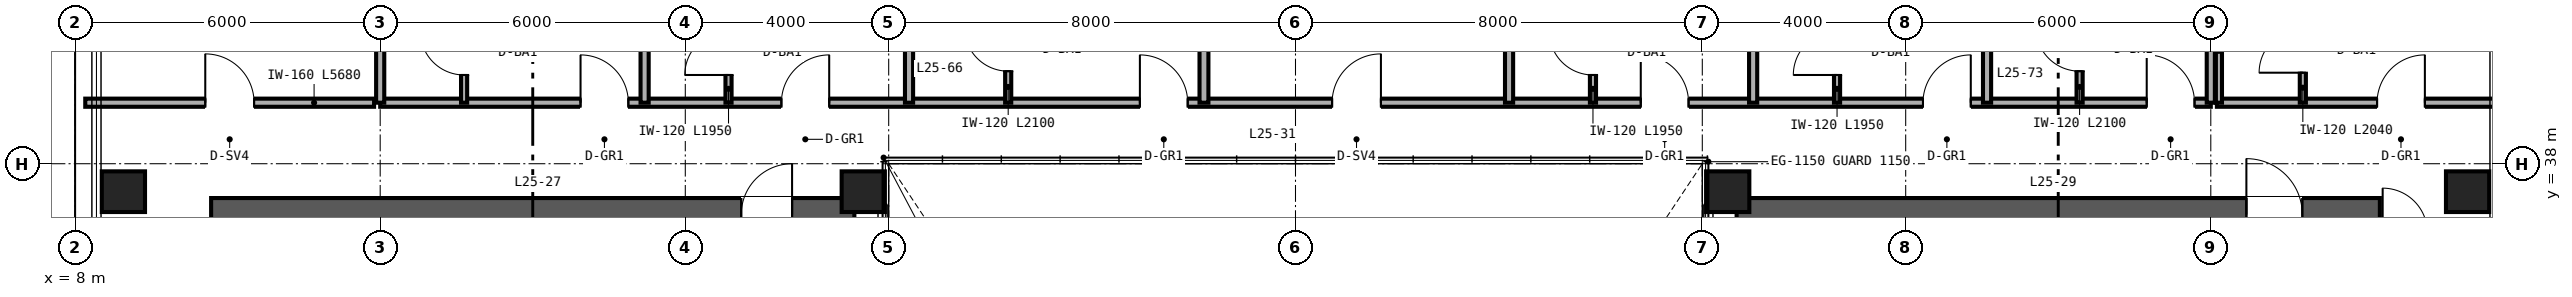
"""IFC4 building model, lengths in metres.
Left out: names, types, materials, properties, quantities, classifications, styles, units other than length and angle.
Written with IfcOpenShell. Run it as: python <this file> out.ifc"""

import sys

from ifc_helpers import new_model, si_unit, direction, frame, frame_2d, origin, origin_2d, place, context, subcontext, project, spatial, rectangle, hollow_rectangle, extrude, source, transform, mapped, element, fill, save


model = new_model("IFC4")
c1 = context("Model", 3, precision=1e-05, world=origin(), true_north=direction((0.0, 1.0)))
c2 = subcontext(c1, "Body", "Model", "MODEL_VIEW")
j1 = project(units=[si_unit("LENGTHUNIT", "METRE"), si_unit("PLANEANGLEUNIT", "RADIAN")], contexts=[c1])
p1 = place(None, origin())
s1 = spatial("IfcSite", under=j1, at=p1, CompositionType="ELEMENT")
p2 = place(p1, origin())
s2 = spatial("IfcBuilding", under=s1, at=p2, CompositionType="ELEMENT")
p3 = place(p2, frame((0.0, 0.0, 104.4)))
s3 = spatial("IfcBuildingStorey", under=s2, at=p3, CompositionType="ELEMENT", Elevation=104.4)
p4 = place(p3, frame((10.675, 37.0, 0.0), z_axis=(0.0, 0.0, 1.0), x_axis=(1.0, 0.0, 0.0)))
e1 = element("IfcWall", 1, at=p4, inside=s3, PredefinedType="SHEAR", context=c2, shape_type="SweptSolid", body=[
    extrude(rectangle(XDim=12.65, YDim=0.65, at=frame_2d((6.325, 0.0))), origin(), (0.0, 0.0, 1.0), 3.36),
])
p5 = place(p4, frame((10.425, 0.0, 0.0)))
e2 = element("IfcOpeningElement", 2, at=p5, cuts=e1, PredefinedType="OPENING", context=c2, shape_type="SweptSolid", body=[
    extrude(rectangle(XDim=1.0, YDim=2.15, at=frame_2d((0.5, 1.075))), frame((0.0, 0.335, 0.0), z_axis=(0.0, -1.0, 0.0), x_axis=(1.0, 0.0, 0.0)), (0.0, 0.0, 1.0), 0.67),
])
p6 = place(p3, frame((40.675, 37.0, 0.0), z_axis=(0.0, 0.0, 1.0), x_axis=(1.0, 0.0, 0.0)))
e3 = element("IfcWall", 3, at=p6, inside=s3, PredefinedType="SHEAR", context=c2, shape_type="SweptSolid", body=[
    extrude(rectangle(XDim=12.65, YDim=0.65, at=frame_2d((6.325, 0.0))), origin(), (0.0, 0.0, 1.0), 3.36),
])
p7 = place(p6, frame((10.025, 0.0, 0.0)))
e4 = element("IfcOpeningElement", 4, at=p7, cuts=e3, PredefinedType="OPENING", context=c2, shape_type="SweptSolid", body=[
    extrude(rectangle(XDim=1.1, YDim=2.15, at=frame_2d((0.55, 1.075))), frame((0.0, 0.335, 0.0), z_axis=(0.0, -1.0, 0.0), x_axis=(1.0, 0.0, 0.0)), (0.0, 0.0, 1.0), 0.67),
])
m1 = source(origin(), c2, "Body", "SweptSolid", [
    extrude(hollow_rectangle(XDim=0.85, YDim=0.8, WallThickness=0.032, at=origin_2d()), origin(), (0.0, 0.0, 1.0), 3.36),
])
for number, where, z_axis, x_axis in (
    (5, (8.95, 37.45, 0.0), (0.0, 0.0, 1.0), (1.0, 0.0, 0.0)),
    (6, (23.5, 37.45, 0.0), (0.0, 0.0, 1.0), (1.0, 0.0, 0.0)),
    (7, (40.5, 37.45, 0.0), (0.0, 0.0, 1.0), (1.0, 0.0, 0.0)),
    (8, (55.05, 37.45, 0.0), (0.0, 0.0, 1.0), (1.0, 0.0, 0.0)),
):
    element("IfcColumn", number, at=place(p3, frame(where, z_axis=z_axis, x_axis=x_axis)), inside=s3, PredefinedType="COLUMN", context=c2, shape_type="MappedRepresentation", body=[
        mapped(m1, transform((0.0, 0.0, 0.0), scale=1.0)),
    ])
p8 = place(p3, frame((8.2, 39.2, 0.0), z_axis=(0.0, 0.0, 1.0), x_axis=(1.0, 0.0, 0.0)))
e9 = element("IfcWall", 9, at=p8, inside=s3, PredefinedType="PARTITIONING", context=c2, shape_type="SweptSolid", body=[
    extrude(rectangle(XDim=5.68, YDim=0.16, at=frame_2d((2.84, 0.0))), origin(), (0.0, 0.0, 1.0), 3.36),
])
p9 = place(p8, frame((2.36, 0.0, 0.0)))
e10 = element("IfcOpeningElement", 10, at=p9, cuts=e9, PredefinedType="OPENING", context=c2, shape_type="SweptSolid", body=[
    extrude(rectangle(XDim=0.96, YDim=2.15, at=frame_2d((0.48, 1.075))), frame((0.0, 0.09, 0.0), z_axis=(0.0, -1.0, 0.0), x_axis=(1.0, 0.0, 0.0)), (0.0, 0.0, 1.0), 0.18),
])
p10 = place(p3, frame((50.12, 39.2, 0.0), z_axis=(0.0, 0.0, 1.0), x_axis=(1.0, 0.0, 0.0)))
e11 = element("IfcWall", 11, at=p10, inside=s3, PredefinedType="PARTITIONING", context=c2, shape_type="SweptSolid", body=[
    extrude(rectangle(XDim=5.68, YDim=0.16, at=frame_2d((2.84, 0.0))), origin(), (0.0, 0.0, 1.0), 3.36),
])
p11 = place(p10, frame((3.15, 0.0, 0.0)))
e12 = element("IfcOpeningElement", 12, at=p11, cuts=e11, PredefinedType="OPENING", context=c2, shape_type="SweptSolid", body=[
    extrude(rectangle(XDim=0.94, YDim=2.15, at=frame_2d((0.47, 1.075))), frame((0.0, 0.09, 0.0), z_axis=(0.0, -1.0, 0.0), x_axis=(1.0, 0.0, 0.0)), (0.0, 0.0, 1.0), 0.18),
])
p12 = place(p3, frame((51.81, 39.2, 0.0), z_axis=(0.0, 0.0, 1.0), x_axis=(0.0, 1.0, 0.0)))
e13 = element("IfcWall", 13, at=p12, inside=s3, PredefinedType="PARTITIONING", context=c2, shape_type="SweptSolid", body=[
    extrude(rectangle(XDim=2.04, YDim=0.12, at=frame_2d((1.02, 0.0))), origin(), (0.0, 0.0, 1.0), 3.36),
])
p13 = place(p12, frame((0.59, 0.0, 0.0)))
e14 = element("IfcOpeningElement", 14, at=p13, cuts=e13, PredefinedType="OPENING", context=c2, shape_type="SweptSolid", body=[
    extrude(rectangle(XDim=0.86, YDim=2.1, at=frame_2d((0.43, 1.05))), frame((0.0, 0.07, 0.0), z_axis=(0.0, -1.0, 0.0), x_axis=(1.0, 0.0, 0.0)), (0.0, 0.0, 1.0), 0.14),
])
p14 = place(p3, frame((50.16, 39.2, 0.0), z_axis=(0.0, 0.0, 1.0), x_axis=(0.0, 1.0, 0.0)))
e15 = element("IfcWall", 15, at=p14, inside=s3, PredefinedType="PARTITIONING", context=c2, shape_type="SweptSolid", body=[
    extrude(rectangle(XDim=2.04, YDim=0.12, at=frame_2d((1.02, 0.0))), origin(), (0.0, 0.0, 1.0), 3.36),
])
p15 = place(p3, frame((14.0, 39.2, 0.0), z_axis=(0.0, 0.0, 1.0), x_axis=(1.0, 0.0, 0.0)))
e16 = element("IfcWall", 16, at=p15, inside=s3, PredefinedType="PARTITIONING", context=c2, shape_type="SweptSolid", body=[
    extrude(rectangle(XDim=36.0, YDim=0.16, at=frame_2d((18.0, 0.0))), origin(), (0.0, 0.0, 1.0), 2.581),
])
p16 = place(p15, frame((3.94, 0.0, 0.0)))
e17 = element("IfcOpeningElement", 17, at=p16, cuts=e16, PredefinedType="OPENING", context=c2, shape_type="SweptSolid", body=[
    extrude(rectangle(XDim=0.94, YDim=2.15, at=frame_2d((0.47, 1.075))), frame((0.0, 0.09, 0.0), z_axis=(0.0, -1.0, 0.0), x_axis=(1.0, 0.0, 0.0)), (0.0, 0.0, 1.0), 0.18),
])
p17 = place(p15, frame((7.89, 0.0, 0.0)))
e18 = element("IfcOpeningElement", 18, at=p17, cuts=e16, PredefinedType="OPENING", context=c2, shape_type="SweptSolid", body=[
    extrude(rectangle(XDim=0.94, YDim=2.15, at=frame_2d((0.47, 1.075))), frame((0.0, 0.09, 0.0), z_axis=(0.0, -1.0, 0.0), x_axis=(1.0, 0.0, 0.0)), (0.0, 0.0, 1.0), 0.18),
])
p18 = place(p15, frame((14.94, 0.0, 0.0)))
e19 = element("IfcOpeningElement", 19, at=p18, cuts=e16, PredefinedType="OPENING", context=c2, shape_type="SweptSolid", body=[
    extrude(rectangle(XDim=0.94, YDim=2.15, at=frame_2d((0.47, 1.075))), frame((0.0, 0.09, 0.0), z_axis=(0.0, -1.0, 0.0), x_axis=(1.0, 0.0, 0.0)), (0.0, 0.0, 1.0), 0.18),
])
p19 = place(p15, frame((18.72, 0.0, 0.0)))
e20 = element("IfcOpeningElement", 20, at=p19, cuts=e16, PredefinedType="OPENING", context=c2, shape_type="SweptSolid", body=[
    extrude(rectangle(XDim=0.96, YDim=2.15, at=frame_2d((0.48, 1.075))), frame((0.0, 0.09, 0.0), z_axis=(0.0, -1.0, 0.0), x_axis=(1.0, 0.0, 0.0)), (0.0, 0.0, 1.0), 0.18),
])
p20 = place(p15, frame((24.79, 0.0, 0.0)))
e21 = element("IfcOpeningElement", 21, at=p20, cuts=e16, PredefinedType="OPENING", context=c2, shape_type="SweptSolid", body=[
    extrude(rectangle(XDim=0.94, YDim=2.15, at=frame_2d((0.47, 1.075))), frame((0.0, 0.09, 0.0), z_axis=(0.0, -1.0, 0.0), x_axis=(1.0, 0.0, 0.0)), (0.0, 0.0, 1.0), 0.18),
])
p21 = place(p15, frame((30.34, 0.0, 0.0)))
e22 = element("IfcOpeningElement", 22, at=p21, cuts=e16, PredefinedType="OPENING", context=c2, shape_type="SweptSolid", body=[
    extrude(rectangle(XDim=0.94, YDim=2.15, at=frame_2d((0.47, 1.075))), frame((0.0, 0.09, 0.0), z_axis=(0.0, -1.0, 0.0), x_axis=(1.0, 0.0, 0.0)), (0.0, 0.0, 1.0), 0.18),
])
p22 = place(p15, frame((34.74, 0.0, 0.0)))
e23 = element("IfcOpeningElement", 23, at=p22, cuts=e16, PredefinedType="OPENING", context=c2, shape_type="SweptSolid", body=[
    extrude(rectangle(XDim=0.94, YDim=2.15, at=frame_2d((0.47, 1.075))), frame((0.0, 0.09, 0.0), z_axis=(0.0, -1.0, 0.0), x_axis=(1.0, 0.0, 0.0)), (0.0, 0.0, 1.0), 0.18),
])
for number, where, z_axis, x_axis in (
    (24, (14.0, 39.2, 0.0), (0.0, 0.0, 1.0), (0.0, 1.0, 0.0)),
    (25, (50.0, 39.2, 0.0), (0.0, 0.0, 1.0), (0.0, 1.0, 0.0)),
    (26, (19.2, 39.2, 0.0), (0.0, 0.0, 1.0), (0.0, 1.0, 0.0)),
):
    element("IfcWall", number, at=place(p3, frame(where, z_axis=z_axis, x_axis=x_axis)), inside=s3, PredefinedType="PARTITIONING", context=c2, shape_type="SweptSolid", body=[
        extrude(rectangle(XDim=10.44, YDim=0.16, at=frame_2d((5.22, 0.0))), origin(), (0.0, 0.0, 1.0), 2.667),
    ])
p23 = place(p3, frame((15.65, 39.2, 0.0), z_axis=(0.0, 0.0, 1.0), x_axis=(0.0, 1.0, 0.0)))
e27 = element("IfcWall", 27, at=p23, inside=s3, PredefinedType="PARTITIONING", context=c2, shape_type="SweptSolid", body=[
    extrude(rectangle(XDim=1.95, YDim=0.12, at=frame_2d((0.975, 0.0))), origin(), (0.0, 0.0, 1.0), 3.36),
])
p24 = place(p23, frame((0.545, 0.0, 0.0)))
e28 = element("IfcOpeningElement", 28, at=p24, cuts=e27, PredefinedType="OPENING", context=c2, shape_type="SweptSolid", body=[
    extrude(rectangle(XDim=0.86, YDim=2.1, at=frame_2d((0.43, 1.05))), frame((0.0, 0.07, 0.0), z_axis=(0.0, -1.0, 0.0), x_axis=(1.0, 0.0, 0.0)), (0.0, 0.0, 1.0), 0.14),
])
p25 = place(p3, frame((24.4, 39.2, 0.0), z_axis=(0.0, 0.0, 1.0), x_axis=(0.0, 1.0, 0.0)))
e29 = element("IfcWall", 29, at=p25, inside=s3, PredefinedType="PARTITIONING", context=c2, shape_type="SweptSolid", body=[
    extrude(rectangle(XDim=10.44, YDim=0.16, at=frame_2d((5.22, 0.0))), origin(), (0.0, 0.0, 1.0), 2.433),
])
p26 = place(p3, frame((20.85, 39.2, 0.0), z_axis=(0.0, 0.0, 1.0), x_axis=(0.0, 1.0, 0.0)))
e30 = element("IfcWall", 30, at=p26, inside=s3, PredefinedType="PARTITIONING", context=c2, shape_type="SweptSolid", body=[
    extrude(rectangle(XDim=1.95, YDim=0.12, at=frame_2d((0.975, 0.0))), origin(), (0.0, 0.0, 1.0), 3.36),
])
p27 = place(p26, frame((0.545, 0.0, 0.0)))
e31 = element("IfcOpeningElement", 31, at=p27, cuts=e30, PredefinedType="OPENING", context=c2, shape_type="SweptSolid", body=[
    extrude(rectangle(XDim=0.86, YDim=2.1, at=frame_2d((0.43, 1.05))), frame((0.0, 0.07, 0.0), z_axis=(0.0, -1.0, 0.0), x_axis=(1.0, 0.0, 0.0)), (0.0, 0.0, 1.0), 0.14),
])
p28 = place(p3, frame((30.2, 39.2, 0.0), z_axis=(0.0, 0.0, 1.0), x_axis=(0.0, 1.0, 0.0)))
e32 = element("IfcWall", 32, at=p28, inside=s3, PredefinedType="PARTITIONING", context=c2, shape_type="SweptSolid", body=[
    extrude(rectangle(XDim=10.44, YDim=0.175, at=frame_2d((5.22, 0.0))), origin(), (0.0, 0.0, 1.0), 2.433),
])
p29 = place(p3, frame((26.35, 39.2, 0.0), z_axis=(0.0, 0.0, 1.0), x_axis=(0.0, 1.0, 0.0)))
e33 = element("IfcWall", 33, at=p29, inside=s3, PredefinedType="PARTITIONING", context=c2, shape_type="SweptSolid", body=[
    extrude(rectangle(XDim=2.1, YDim=0.12, at=frame_2d((1.05, 0.0))), origin(), (0.0, 0.0, 1.0), 3.36),
])
p30 = place(p29, frame((0.62, 0.0, 0.0)))
e34 = element("IfcOpeningElement", 34, at=p30, cuts=e33, PredefinedType="OPENING", context=c2, shape_type="SweptSolid", body=[
    extrude(rectangle(XDim=0.86, YDim=2.1, at=frame_2d((0.43, 1.05))), frame((0.0, 0.07, 0.0), z_axis=(0.0, -1.0, 0.0), x_axis=(1.0, 0.0, 0.0)), (0.0, 0.0, 1.0), 0.14),
])
p31 = place(p3, frame((36.2, 39.2, 0.0), z_axis=(0.0, 0.0, 1.0), x_axis=(0.0, 1.0, 0.0)))
e35 = element("IfcWall", 35, at=p31, inside=s3, PredefinedType="PARTITIONING", context=c2, shape_type="SweptSolid", body=[
    extrude(rectangle(XDim=10.44, YDim=0.16, at=frame_2d((5.22, 0.0))), origin(), (0.0, 0.0, 1.0), 2.433),
])
p32 = place(p3, frame((41.0, 39.2, 0.0), z_axis=(0.0, 0.0, 1.0), x_axis=(0.0, 1.0, 0.0)))
e36 = element("IfcWall", 36, at=p32, inside=s3, PredefinedType="PARTITIONING", context=c2, shape_type="SweptSolid", body=[
    extrude(rectangle(XDim=10.44, YDim=0.16, at=frame_2d((5.22, 0.0))), origin(), (0.0, 0.0, 1.0), 2.823),
])
p33 = place(p3, frame((37.85, 39.2, 0.0), z_axis=(0.0, 0.0, 1.0), x_axis=(0.0, 1.0, 0.0)))
e37 = element("IfcWall", 37, at=p33, inside=s3, PredefinedType="PARTITIONING", context=c2, shape_type="SweptSolid", body=[
    extrude(rectangle(XDim=1.95, YDim=0.12, at=frame_2d((0.975, 0.0))), origin(), (0.0, 0.0, 1.0), 3.36),
])
p34 = place(p33, frame((0.545, 0.0, 0.0)))
e38 = element("IfcOpeningElement", 38, at=p34, cuts=e37, PredefinedType="OPENING", context=c2, shape_type="SweptSolid", body=[
    extrude(rectangle(XDim=0.86, YDim=2.1, at=frame_2d((0.43, 1.05))), frame((0.0, 0.07, 0.0), z_axis=(0.0, -1.0, 0.0), x_axis=(1.0, 0.0, 0.0)), (0.0, 0.0, 1.0), 0.14),
])
p35 = place(p3, frame((45.6, 39.2, 0.0), z_axis=(0.0, 0.0, 1.0), x_axis=(0.0, 1.0, 0.0)))
e39 = element("IfcWall", 39, at=p35, inside=s3, PredefinedType="PARTITIONING", context=c2, shape_type="SweptSolid", body=[
    extrude(rectangle(XDim=10.44, YDim=0.16, at=frame_2d((5.22, 0.0))), origin(), (0.0, 0.0, 1.0), 2.667),
])
p36 = place(p3, frame((42.65, 39.2, 0.0), z_axis=(0.0, 0.0, 1.0), x_axis=(0.0, 1.0, 0.0)))
e40 = element("IfcWall", 40, at=p36, inside=s3, PredefinedType="PARTITIONING", context=c2, shape_type="SweptSolid", body=[
    extrude(rectangle(XDim=1.95, YDim=0.12, at=frame_2d((0.975, 0.0))), origin(), (0.0, 0.0, 1.0), 3.36),
])
p37 = place(p36, frame((0.545, 0.0, 0.0)))
e41 = element("IfcOpeningElement", 41, at=p37, cuts=e40, PredefinedType="OPENING", context=c2, shape_type="SweptSolid", body=[
    extrude(rectangle(XDim=0.86, YDim=2.1, at=frame_2d((0.43, 1.05))), frame((0.0, 0.07, 0.0), z_axis=(0.0, -1.0, 0.0), x_axis=(1.0, 0.0, 0.0)), (0.0, 0.0, 1.0), 0.14),
])
p38 = place(p3, frame((47.42, 39.2, 0.0), z_axis=(0.0, 0.0, 1.0), x_axis=(0.0, 1.0, 0.0)))
e42 = element("IfcWall", 42, at=p38, inside=s3, PredefinedType="PARTITIONING", context=c2, shape_type="SweptSolid", body=[
    extrude(rectangle(XDim=2.1, YDim=0.12, at=frame_2d((1.05, 0.0))), origin(), (0.0, 0.0, 1.0), 3.36),
])
p39 = place(p38, frame((0.62, 0.0, 0.0)))
e43 = element("IfcOpeningElement", 43, at=p39, cuts=e42, PredefinedType="OPENING", context=c2, shape_type="SweptSolid", body=[
    extrude(rectangle(XDim=0.86, YDim=2.1, at=frame_2d((0.43, 1.05))), frame((0.0, 0.07, 0.0), z_axis=(0.0, -1.0, 0.0), x_axis=(1.0, 0.0, 0.0)), (0.0, 0.0, 1.0), 0.14),
])
m2 = source(origin(), c2, "Body", "SweptSolid", [
    extrude(rectangle(XDim=1.0, YDim=2.15, at=frame_2d((0.5, 1.075))), frame((0.0, 0.025, 0.0), z_axis=(0.0, -1.0, 0.0), x_axis=(1.0, 0.0, 0.0)), (0.0, 0.0, 1.0), 0.05),
])
p40 = place(p5, origin())
e44 = element("IfcDoor", 44, at=p40, inside=s3, OperationType="SINGLE_SWING_RIGHT", PredefinedType="DOOR", context=c2, shape_type="MappedRepresentation", body=[
    mapped(m2, transform((0.0, 0.0, 0.0), scale=1.0)),
])
fill(e2, e44)
m3 = source(origin(), c2, "Body", "SweptSolid", [
    extrude(rectangle(XDim=1.1, YDim=2.15, at=frame_2d((0.55, 1.075))), frame((0.0, 0.025, 0.0), z_axis=(0.0, -1.0, 0.0), x_axis=(1.0, 0.0, 0.0)), (0.0, 0.0, 1.0), 0.05),
])
p41 = place(p7, origin())
e45 = element("IfcDoor", 45, at=p41, inside=s3, OperationType="SINGLE_SWING_LEFT", PredefinedType="DOOR", context=c2, shape_type="MappedRepresentation", body=[
    mapped(m3, transform((0.0, 0.0, 0.0), scale=1.0)),
])
fill(e4, e45)
m4 = source(origin(), c2, "Body", "SweptSolid", [
    extrude(rectangle(XDim=0.96, YDim=2.15, at=frame_2d((0.48, 1.075))), frame((0.0, 0.025, 0.0), z_axis=(0.0, -1.0, 0.0), x_axis=(1.0, 0.0, 0.0)), (0.0, 0.0, 1.0), 0.05),
])
p42 = place(p9, origin())
e46 = element("IfcDoor", 46, at=p42, inside=s3, OperationType="SINGLE_SWING_LEFT", PredefinedType="DOOR", context=c2, shape_type="MappedRepresentation", body=[
    mapped(m4, transform((0.0, 0.0, 0.0), scale=1.0)),
])
fill(e10, e46)
m5 = source(origin(), c2, "Body", "SweptSolid", [
    extrude(rectangle(XDim=0.86, YDim=2.1, at=frame_2d((0.43, 1.05))), frame((0.0, 0.025, 0.0), z_axis=(0.0, -1.0, 0.0), x_axis=(1.0, 0.0, 0.0)), (0.0, 0.0, 1.0), 0.05),
])
p43 = place(p13, origin())
e47 = element("IfcDoor", 47, at=p43, inside=s3, OperationType="SINGLE_SWING_LEFT", PredefinedType="DOOR", context=c2, shape_type="MappedRepresentation", body=[
    mapped(m5, transform((0.0, 0.0, 0.0), scale=1.0)),
])
fill(e14, e47)
m6 = source(origin(), c2, "Body", "SweptSolid", [
    extrude(rectangle(XDim=0.94, YDim=2.15, at=frame_2d((0.47, 1.075))), frame((0.0, 0.025, 0.0), z_axis=(0.0, -1.0, 0.0), x_axis=(1.0, 0.0, 0.0)), (0.0, 0.0, 1.0), 0.05),
])
p44 = place(p11, origin())
e48 = element("IfcDoor", 48, at=p44, inside=s3, OperationType="SINGLE_SWING_RIGHT", PredefinedType="DOOR", context=c2, shape_type="MappedRepresentation", body=[
    mapped(m6, transform((0.0, 0.0, 0.0), scale=1.0)),
])
fill(e12, e48)
p45 = place(p24, origin())
e49 = element("IfcDoor", 49, at=p45, inside=s3, OperationType="SINGLE_SWING_RIGHT", PredefinedType="DOOR", context=c2, shape_type="MappedRepresentation", body=[
    mapped(m5, transform((0.0, 0.0, 0.0), scale=1.0)),
])
fill(e28, e49)
p46 = place(p27, origin())
e50 = element("IfcDoor", 50, at=p46, inside=s3, OperationType="SINGLE_SWING_LEFT", PredefinedType="DOOR", context=c2, shape_type="MappedRepresentation", body=[
    mapped(m5, transform((0.0, 0.0, 0.0), scale=1.0)),
])
fill(e31, e50)
p47 = place(p30, origin())
e51 = element("IfcDoor", 51, at=p47, inside=s3, OperationType="SINGLE_SWING_RIGHT", PredefinedType="DOOR", context=c2, shape_type="MappedRepresentation", body=[
    mapped(m5, transform((0.0, 0.0, 0.0), scale=1.0)),
])
fill(e34, e51)
p48 = place(p34, origin())
e52 = element("IfcDoor", 52, at=p48, inside=s3, OperationType="SINGLE_SWING_RIGHT", PredefinedType="DOOR", context=c2, shape_type="MappedRepresentation", body=[
    mapped(m5, transform((0.0, 0.0, 0.0), scale=1.0)),
])
fill(e38, e52)
p49 = place(p37, origin())
e53 = element("IfcDoor", 53, at=p49, inside=s3, OperationType="SINGLE_SWING_LEFT", PredefinedType="DOOR", context=c2, shape_type="MappedRepresentation", body=[
    mapped(m5, transform((0.0, 0.0, 0.0), scale=1.0)),
])
fill(e41, e53)
p50 = place(p39, origin())
e54 = element("IfcDoor", 54, at=p50, inside=s3, OperationType="SINGLE_SWING_RIGHT", PredefinedType="DOOR", context=c2, shape_type="MappedRepresentation", body=[
    mapped(m5, transform((0.0, 0.0, 0.0), scale=1.0)),
])
fill(e43, e54)
p51 = place(p16, origin())
e55 = element("IfcDoor", 55, at=p51, inside=s3, OperationType="SINGLE_SWING_LEFT", PredefinedType="DOOR", context=c2, shape_type="MappedRepresentation", body=[
    mapped(m6, transform((0.0, 0.0, 0.0), scale=1.0)),
])
fill(e17, e55)
p52 = place(p17, origin())
e56 = element("IfcDoor", 56, at=p52, inside=s3, OperationType="SINGLE_SWING_RIGHT", PredefinedType="DOOR", context=c2, shape_type="MappedRepresentation", body=[
    mapped(m6, transform((0.0, 0.0, 0.0), scale=1.0)),
])
fill(e18, e56)
p53 = place(p18, origin())
e57 = element("IfcDoor", 57, at=p53, inside=s3, OperationType="SINGLE_SWING_LEFT", PredefinedType="DOOR", context=c2, shape_type="MappedRepresentation", body=[
    mapped(m6, transform((0.0, 0.0, 0.0), scale=1.0)),
])
fill(e19, e57)
p54 = place(p19, origin())
e58 = element("IfcDoor", 58, at=p54, inside=s3, OperationType="SINGLE_SWING_RIGHT", PredefinedType="DOOR", context=c2, shape_type="MappedRepresentation", body=[
    mapped(m4, transform((0.0, 0.0, 0.0), scale=1.0)),
])
fill(e20, e58)
p55 = place(p20, origin())
e59 = element("IfcDoor", 59, at=p55, inside=s3, OperationType="SINGLE_SWING_LEFT", PredefinedType="DOOR", context=c2, shape_type="MappedRepresentation", body=[
    mapped(m6, transform((0.0, 0.0, 0.0), scale=1.0)),
])
fill(e21, e59)
p56 = place(p21, origin())
e60 = element("IfcDoor", 60, at=p56, inside=s3, OperationType="SINGLE_SWING_RIGHT", PredefinedType="DOOR", context=c2, shape_type="MappedRepresentation", body=[
    mapped(m6, transform((0.0, 0.0, 0.0), scale=1.0)),
])
fill(e22, e60)
p57 = place(p22, origin())
e61 = element("IfcDoor", 61, at=p57, inside=s3, OperationType="SINGLE_SWING_LEFT", PredefinedType="DOOR", context=c2, shape_type="MappedRepresentation", body=[
    mapped(m6, transform((0.0, 0.0, 0.0), scale=1.0)),
])
fill(e23, e61)
save(model, sys.argv[1])
